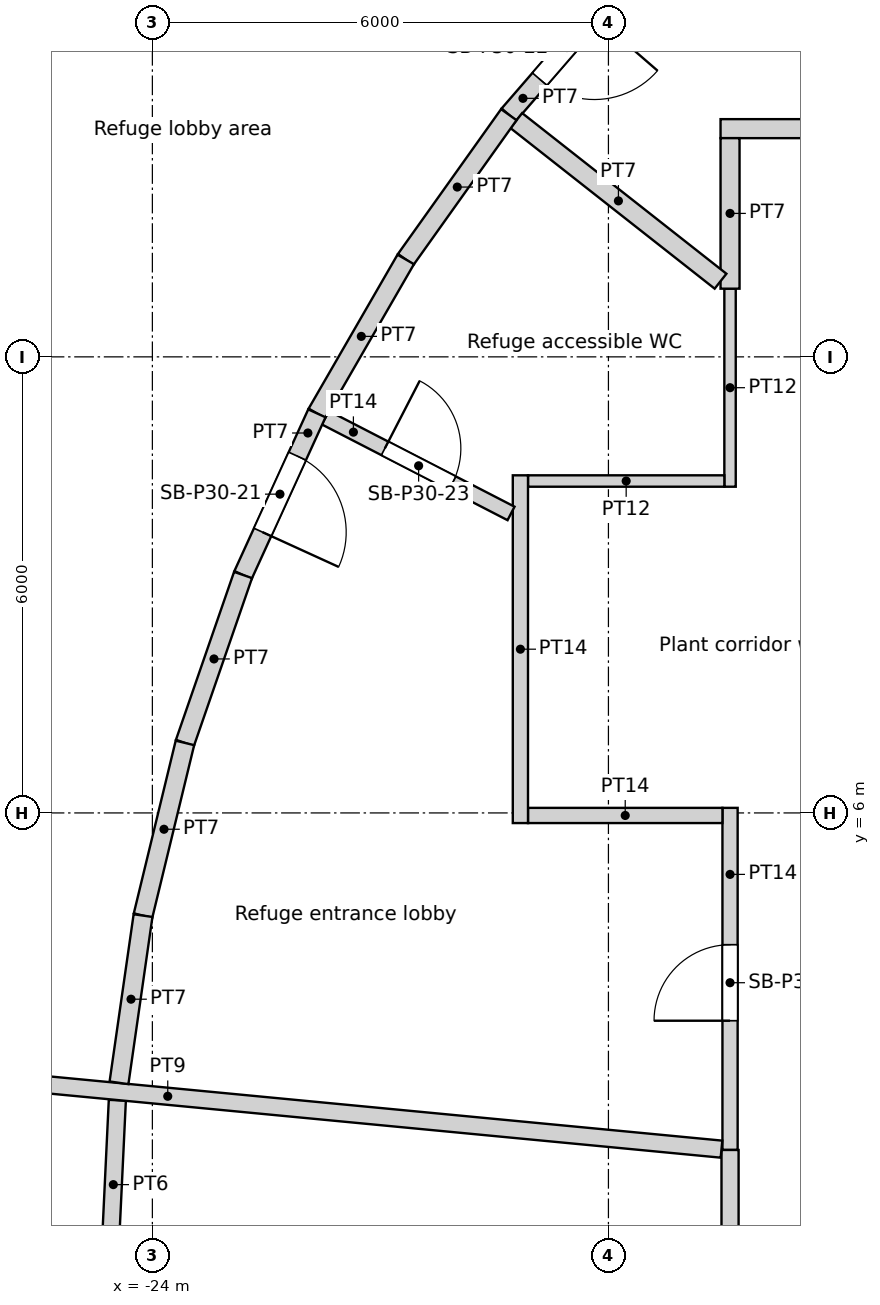
"""IFC4 building model, lengths in metres.
Left out: names, types, materials, properties, quantities, classifications, styles, units other than length and angle.
Written with IfcOpenShell. Run it as: python <this file> out.ifc"""

import sys

from ifc_helpers import new_model, si_unit, direction, frame, frame_2d, origin, origin_2d, place, context, subcontext, project, spatial, rectangle, circle, extrude, element, fill, save


model = new_model("IFC4")
c1 = context("Model", 3, precision=1e-05, world=origin(), true_north=direction((0.0, 1.0)))
c2 = subcontext(c1, "Body", "Model", "MODEL_VIEW")
j1 = project(units=[si_unit("LENGTHUNIT", "METRE"), si_unit("PLANEANGLEUNIT", "RADIAN")], contexts=[c1])
p1 = place(None, origin())
s1 = spatial("IfcSite", under=j1, at=p1, CompositionType="ELEMENT")
p2 = place(p1, origin())
s2 = spatial("IfcBuilding", under=s1, at=p2, CompositionType="ELEMENT")
p3 = place(p2, frame((0.0, 0.0, 120.0)))
s3 = spatial("IfcBuildingStorey", under=s2, at=p3, CompositionType="ELEMENT", Elevation=120.0)
for number, where, z_axis, x_axis in (
    (1, (-20.509, 13.489, 0.0), (0.0, 0.0, 1.0), (1.0, 0.0, 0.0)),
    (2, (-23.067, 8.396, 0.0), (0.0, 0.0, 1.0), (1.0, 0.0, 0.0)),
    (3, (-24.382, 2.85, 0.0), (0.0, 0.0, 1.0), (1.0, 0.0, 0.0)),
):
    element("IfcColumn", number, at=place(p3, frame(where, z_axis=z_axis, x_axis=x_axis)), inside=s3, PredefinedType="COLUMN", context=c2, shape_type="SweptSolid", body=[
        extrude(circle(Radius=0.65, at=origin_2d()), origin(), (0.0, 0.0, 1.0), 6.0),
    ])
for number, where, z_axis, x_axis in (
    (4, (-16.958, 8.167, 0.0), (0.0, 0.0, 1.0), (1.0, 0.0, 0.0)),
    (5, (-18.612, 2.805, 0.0), (0.0, 0.0, 1.0), (1.0, 0.0, 0.0)),
):
    element("IfcColumn", number, at=place(p3, frame(where, z_axis=z_axis, x_axis=x_axis)), inside=s3, PredefinedType="COLUMN", context=c2, shape_type="SweptSolid", body=[
        extrude(circle(Radius=0.7, at=origin_2d()), origin(), (0.0, 0.0, 1.0), 6.0),
    ])
p4 = place(p3, frame((-31.083, 2.968, 0.0), z_axis=(0.0, 0.0, 1.0), x_axis=(0.995471677184, -0.095058613098, 0.0)))
e6 = element("IfcWall", 6, at=p4, inside=s3, PredefinedType="PARTITIONING", context=c2, shape_type="SweptSolid", body=[
    extrude(rectangle(XDim=14.637, YDim=0.225, at=frame_2d((7.318, 0.0))), origin(), (0.0, 0.0, 1.0), 2.7),
])
p5 = place(p3, frame((-24.461, 2.22, 0.0), z_axis=(0.0, 0.0, 1.0), x_axis=(-0.047565149415, -0.998868137724, 0.0)))
e7 = element("IfcWall", 7, at=p5, inside=s3, PredefinedType="PARTITIONING", context=c2, shape_type="SweptSolid", body=[
    extrude(rectangle(XDim=2.222, YDim=0.225, at=frame_2d((1.111, 0.0))), origin(), (0.0, 0.0, 1.0), 5.2),
])
p6 = place(p3, frame((-24.123, 4.649, 0.0), z_axis=(0.0, 0.0, 1.0), x_axis=(-0.142267217793, -0.989828287503, 0.0)))
e8 = element("IfcWall", 8, at=p6, inside=s3, PredefinedType="PARTITIONING", context=c2, shape_type="SweptSolid", body=[
    extrude(rectangle(XDim=2.222, YDim=0.25, at=frame_2d((1.111, 0.0))), origin(), (0.0, 0.0, 1.0), 5.2),
])
p7 = place(p3, frame((-23.572, 6.921, 0.0), z_axis=(0.0, 0.0, 1.0), x_axis=(-0.235821214509, -0.971796457489, 0.0)))
e9 = element("IfcWall", 9, at=p7, inside=s3, PredefinedType="PARTITIONING", context=c2, shape_type="SweptSolid", body=[
    extrude(rectangle(XDim=2.338, YDim=0.25, at=frame_2d((1.169, 0.0))), origin(), (0.0, 0.0, 1.0), 5.2),
])
p8 = place(p3, frame((-22.807, 9.131, 0.0), z_axis=(0.0, 0.0, 1.0), x_axis=(-0.327046007052, -0.945008417566, 0.0)))
e10 = element("IfcWall", 10, at=p8, inside=s3, PredefinedType="PARTITIONING", context=c2, shape_type="SweptSolid", body=[
    extrude(rectangle(XDim=2.338, YDim=0.25, at=frame_2d((1.169, 0.0))), origin(), (0.0, 0.0, 1.0), 5.2),
])
p9 = place(p3, frame((-22.807, 9.131, 0.0), z_axis=(0.0, 0.0, 1.0), x_axis=(0.415438886862, 0.909621092149, 0.0)))
e11 = element("IfcWall", 11, at=p9, inside=s3, PredefinedType="PARTITIONING", context=c2, shape_type="SweptSolid", body=[
    extrude(rectangle(XDim=2.338, YDim=0.25, at=frame_2d((1.169, 0.0))), origin(), (0.0, 0.0, 1.0), 5.2),
])
p10 = place(p9, frame((0.619, 0.0, 0.0)))
e12 = element("IfcOpeningElement", 12, at=p10, cuts=e11, PredefinedType="OPENING", context=c2, shape_type="SweptSolid", body=[
    extrude(rectangle(XDim=1.1, YDim=2.1, at=frame_2d((0.55, 1.05))), frame((0.0, 0.125, 0.0), z_axis=(0.0, -1.0, 0.0), x_axis=(1.0, 0.0, 0.0)), (0.0, 0.0, 1.0), 0.25),
])
p11 = place(p3, frame((-21.725, 11.2, 0.0), z_axis=(0.0, 0.0, 1.0), x_axis=(0.888871548498, -0.458156491028, 0.0)))
e13 = element("IfcWall", 13, at=p11, inside=s3, PredefinedType="PARTITIONING", context=c2, shape_type="SweptSolid", body=[
    extrude(rectangle(XDim=2.749, YDim=0.2, at=frame_2d((1.375, 0.0))), origin(), (0.0, 0.0, 1.0), 5.2),
])
p12 = place(p11, frame((0.881, 0.0, 0.0)))
e14 = element("IfcOpeningElement", 14, at=p12, cuts=e13, PredefinedType="OPENING", context=c2, shape_type="SweptSolid", body=[
    extrude(rectangle(XDim=1.0, YDim=2.1, at=frame_2d((0.5, 1.05))), frame((0.0, 0.1, 0.0), z_axis=(0.0, -1.0, 0.0), x_axis=(1.0, 0.0, 0.0)), (0.0, 0.0, 1.0), 0.2),
])
p13 = place(p3, frame((-20.667, 13.282, 0.0), z_axis=(0.0, 0.0, 1.0), x_axis=(-0.500002679963, -0.866023856502, 0.0)))
e15 = element("IfcWall", 15, at=p13, inside=s3, PredefinedType="PARTITIONING", context=c2, shape_type="SweptSolid", body=[
    extrude(rectangle(XDim=2.338, YDim=0.25, at=frame_2d((1.169, 0.0))), origin(), (0.0, 0.0, 1.0), 5.2),
])
p14 = place(p3, frame((-20.448, 23.598, 0.0), z_axis=(0.0, 0.0, 1.0), x_axis=(0.654866679399, -0.755744422548, 0.0)))
e16 = element("IfcWall", 16, at=p14, inside=s3, PredefinedType="PARTITIONING", context=c2, shape_type="SweptSolid", body=[
    extrude(rectangle(XDim=11.208, YDim=0.225, at=frame_2d((5.604, 0.0))), origin(), (0.0, 0.0, 1.0), 2.7),
])
p15 = place(p3, frame((-19.311, 15.186, 0.0), z_axis=(0.0, 0.0, 1.0), x_axis=(-0.580032319147, -0.814593462252, 0.0)))
e17 = element("IfcWall", 17, at=p15, inside=s3, PredefinedType="PARTITIONING", context=c2, shape_type="SweptSolid", body=[
    extrude(rectangle(XDim=2.338, YDim=0.25, at=frame_2d((1.169, 0.0))), origin(), (0.0, 0.0, 1.0), 5.2),
])
p16 = place(p3, frame((-19.212, 15.109, 0.0), z_axis=(0.0, 0.0, 1.0), x_axis=(0.786080397648, -0.618124266174, 0.0)))
e18 = element("IfcWall", 18, at=p16, inside=s3, PredefinedType="PARTITIONING", context=c2, shape_type="SweptSolid", body=[
    extrude(rectangle(XDim=3.419, YDim=0.25, at=frame_2d((1.709, 0.0))), origin(), (0.0, 0.0, 1.0), 5.2),
])
p17 = place(p3, frame((-19.058, 5.967, 0.0), z_axis=(0.0, 0.0, 1.0), x_axis=(1.0, 0.0, 0.0)))
e19 = element("IfcWall", 19, at=p17, inside=s3, PredefinedType="PARTITIONING", context=c2, shape_type="SweptSolid", body=[
    extrude(rectangle(XDim=2.558, YDim=0.2, at=frame_2d((1.279, 0.0))), origin(), (0.0, 0.0, 1.0), 5.2),
])
p18 = place(p3, frame((-19.158, 10.442, 0.0), z_axis=(0.0, 0.0, 1.0), x_axis=(0.0, -1.0, 0.0)))
e20 = element("IfcWall", 20, at=p18, inside=s3, PredefinedType="PARTITIONING", context=c2, shape_type="SweptSolid", body=[
    extrude(rectangle(XDim=4.575, YDim=0.2, at=frame_2d((2.288, 0.0))), origin(), (0.0, 0.0, 1.0), 5.2),
])
p19 = place(p3, frame((-17.78, 16.953, 0.0), z_axis=(0.0, 0.0, 1.0), x_axis=(-0.654866925236, -0.755744209526, 0.0)))
e21 = element("IfcWall", 21, at=p19, inside=s3, PredefinedType="PARTITIONING", context=c2, shape_type="SweptSolid", body=[
    extrude(rectangle(XDim=2.338, YDim=0.25, at=frame_2d((1.169, 0.0))), origin(), (0.0, 0.0, 1.0), 5.2),
])
p20 = place(p19, frame((0.619, 0.0, 0.0)))
e22 = element("IfcOpeningElement", 22, at=p20, cuts=e21, PredefinedType="OPENING", context=c2, shape_type="SweptSolid", body=[
    extrude(rectangle(XDim=1.1, YDim=2.1, at=frame_2d((0.55, 1.05))), frame((0.0, 0.125, 0.0), z_axis=(0.0, -1.0, 0.0), x_axis=(1.0, 0.0, 0.0)), (0.0, 0.0, 1.0), 0.25),
])
p21 = place(p3, frame((-16.4, 1.566, 0.0), z_axis=(0.0, 0.0, 1.0), x_axis=(0.0, -1.0, 0.0)))
e23 = element("IfcWall", 23, at=p21, inside=s3, PredefinedType="PARTITIONING", context=c2, shape_type="SweptSolid", body=[
    extrude(rectangle(XDim=7.645, YDim=0.225, at=frame_2d((3.823, 0.0))), origin(), (0.0, 0.0, 1.0), 5.2),
])
p22 = place(p21, frame((1.863, 0.0, 0.0)))
e24 = element("IfcOpeningElement", 24, at=p22, cuts=e23, PredefinedType="OPENING", context=c2, shape_type="SweptSolid", body=[
    extrude(rectangle(XDim=1.0, YDim=2.1, at=frame_2d((0.5, 1.05))), frame((0.0, 0.113, 0.0), z_axis=(0.0, -1.0, 0.0), x_axis=(1.0, 0.0, 0.0)), (0.0, 0.0, 1.0), 0.225),
])
p23 = place(p3, frame((-16.4, 6.067, 0.0), z_axis=(0.0, 0.0, 1.0), x_axis=(0.0, -1.0, 0.0)))
e25 = element("IfcWall", 25, at=p23, inside=s3, PredefinedType="PARTITIONING", context=c2, shape_type="SweptSolid", body=[
    extrude(rectangle(XDim=4.501, YDim=0.2, at=frame_2d((2.25, 0.0))), origin(), (0.0, 0.0, 1.0), 5.2),
])
p24 = place(p23, frame((1.8, 0.0, 0.0)))
e26 = element("IfcOpeningElement", 26, at=p24, cuts=e25, PredefinedType="OPENING", context=c2, shape_type="SweptSolid", body=[
    extrude(rectangle(XDim=1.0, YDim=2.1, at=frame_2d((0.5, 1.05))), frame((0.0, 0.1, 0.0), z_axis=(0.0, -1.0, 0.0), x_axis=(1.0, 0.0, 0.0)), (0.0, 0.0, 1.0), 0.2),
])
p25 = place(p3, frame((-16.475, 10.367, 0.0), z_axis=(0.0, 0.0, 1.0), x_axis=(-1.0, 0.0, 0.0)))
e27 = element("IfcWall", 27, at=p25, inside=s3, PredefinedType="PARTITIONING", context=c2, shape_type="SweptSolid", body=[
    extrude(rectangle(XDim=2.583, YDim=0.15, at=frame_2d((1.292, 0.0))), origin(), (0.0, 0.0, 1.0), 5.2),
])
p26 = place(p3, frame((-16.4, 12.897, 0.0), z_axis=(0.0, 0.0, 1.0), x_axis=(0.0, -1.0, 0.0)))
e28 = element("IfcWall", 28, at=p26, inside=s3, PredefinedType="PARTITIONING", context=c2, shape_type="SweptSolid", body=[
    extrude(rectangle(XDim=2.606, YDim=0.15, at=frame_2d((1.303, 0.0))), origin(), (0.0, 0.0, 1.0), 5.2),
])
p27 = place(p3, frame((-16.4, 14.877, 0.0), z_axis=(0.0, 0.0, 1.0), x_axis=(0.0, -1.0, 0.0)))
e29 = element("IfcWall", 29, at=p27, inside=s3, PredefinedType="PARTITIONING", context=c2, shape_type="SweptSolid", body=[
    extrude(rectangle(XDim=1.98, YDim=0.25, at=frame_2d((0.99, 0.0))), origin(), (0.0, 0.0, 1.0), 5.2),
])
p28 = place(p3, frame((-13.0, 15.002, 0.0), z_axis=(0.0, 0.0, 1.0), x_axis=(-1.0, 0.0, 0.0)))
e30 = element("IfcWall", 30, at=p28, inside=s3, PredefinedType="PARTITIONING", context=c2, shape_type="SweptSolid", body=[
    extrude(rectangle(XDim=3.525, YDim=0.25, at=frame_2d((1.763, 0.0))), origin(), (0.0, 0.0, 1.0), 5.2),
])
p29 = place(p24, origin())
e31 = element("IfcDoor", 31, at=p29, inside=s3, OperationType="SINGLE_SWING_LEFT", PredefinedType="DOOR", context=c2, shape_type="SweptSolid", body=[
    extrude(rectangle(XDim=1.0, YDim=2.1, at=frame_2d((0.5, 1.05))), frame((0.0, 0.025, 0.0), z_axis=(0.0, -1.0, 0.0), x_axis=(1.0, 0.0, 0.0)), (0.0, 0.0, 1.0), 0.05),
])
fill(e26, e31)
p30 = place(p10, origin())
e32 = element("IfcDoor", 32, at=p30, inside=s3, OperationType="SINGLE_SWING_RIGHT", PredefinedType="DOOR", context=c2, shape_type="SweptSolid", body=[
    extrude(rectangle(XDim=1.1, YDim=2.1, at=frame_2d((0.55, 1.05))), frame((0.0, 0.025, 0.0), z_axis=(0.0, -1.0, 0.0), x_axis=(1.0, 0.0, 0.0)), (0.0, 0.0, 1.0), 0.05),
])
fill(e12, e32)
p31 = place(p20, origin())
e33 = element("IfcDoor", 33, at=p31, inside=s3, OperationType="SINGLE_SWING_LEFT", PredefinedType="DOOR", context=c2, shape_type="SweptSolid", body=[
    extrude(rectangle(XDim=1.1, YDim=2.1, at=frame_2d((0.55, 1.05))), frame((0.0, 0.025, 0.0), z_axis=(0.0, -1.0, 0.0), x_axis=(1.0, 0.0, 0.0)), (0.0, 0.0, 1.0), 0.05),
])
fill(e22, e33)
p32 = place(p12, origin())
e34 = element("IfcDoor", 34, at=p32, inside=s3, OperationType="SINGLE_SWING_LEFT", PredefinedType="DOOR", context=c2, shape_type="SweptSolid", body=[
    extrude(rectangle(XDim=1.0, YDim=2.1, at=frame_2d((0.5, 1.05))), frame((0.0, 0.025, 0.0), z_axis=(0.0, -1.0, 0.0), x_axis=(1.0, 0.0, 0.0)), (0.0, 0.0, 1.0), 0.05),
])
fill(e14, e34)
save(model, sys.argv[1])
